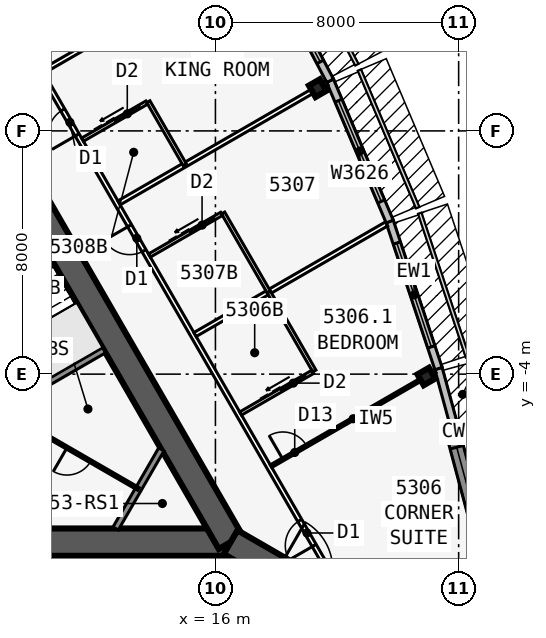
"""IFC4 building model, lengths in metres.
Left out: names, types, materials, properties, quantities, classifications, styles, units other than length and angle.
Written with IfcOpenShell. Run it as: python <this file> out.ifc"""

import sys

from ifc_helpers import new_model, si_unit, direction, frame, frame_2d, origin, origin_2d, place, context, subcontext, project, spatial, polyline, rectangle, i_section, outline, extrude, element, fill, save


model = new_model("IFC4")
c1 = context("Model", 3, precision=1e-05, world=origin(), true_north=direction((0.0, 1.0)))
c2 = subcontext(c1, "Body", "Model", "MODEL_VIEW")
j1 = project(units=[si_unit("LENGTHUNIT", "METRE"), si_unit("PLANEANGLEUNIT", "RADIAN")], contexts=[c1])
p1 = place(None, origin())
s1 = spatial("IfcSite", under=j1, at=p1, CompositionType="ELEMENT")
p2 = place(p1, origin())
s2 = spatial("IfcBuilding", under=s1, at=p2, CompositionType="ELEMENT")
p3 = place(p2, frame((0.0, 0.0, 200.9)))
s3 = spatial("IfcBuildingStorey", under=s2, at=p3, CompositionType="ELEMENT", Elevation=200.9)
p4 = place(p3, frame((-16.5, -9.526, 0.0), z_axis=(0.0, 0.0, 1.0), x_axis=(1.0, 0.0, 0.0)))
e1 = element("IfcWall", 1, at=p4, inside=s3, PredefinedType="SHEAR", context=c2, shape_type="SweptSolid", body=[
    extrude(rectangle(XDim=33.0, YDim=0.9, at=frame_2d((16.5, 0.0))), origin(), (0.0, 0.0, 1.0), 3.6),
])
p5 = place(p4, frame((14.05, 0.0, 0.0)))
e2 = element("IfcOpeningElement", 2, at=p5, cuts=e1, PredefinedType="OPENING", context=c2, shape_type="SweptSolid", body=[
    extrude(rectangle(XDim=1.8, YDim=2.13, at=frame_2d((0.9, 1.065))), frame((0.0, 0.46, 0.0), z_axis=(0.0, -1.0, 0.0), x_axis=(1.0, 0.0, 0.0)), (0.0, 0.0, 1.0), 0.92),
])
p6 = place(p3, frame((16.5, -9.526, 0.0), z_axis=(0.0, 0.0, 1.0), x_axis=(-0.499999749417, 0.866025548458, 0.0)))
e3 = element("IfcWall", 3, at=p6, inside=s3, PredefinedType="SHEAR", context=c2, shape_type="SweptSolid", body=[
    extrude(rectangle(XDim=33.0, YDim=0.9, at=frame_2d((16.5, 0.0))), origin(), (0.0, 0.0, 1.0), 3.6),
])
p7 = place(p6, frame((14.15, 0.0, 0.0)))
e4 = element("IfcOpeningElement", 4, at=p7, cuts=e3, PredefinedType="OPENING", context=c2, shape_type="SweptSolid", body=[
    extrude(rectangle(XDim=1.8, YDim=2.13, at=frame_2d((0.9, 1.065))), frame((0.0, 0.46, 0.0), z_axis=(0.0, -1.0, 0.0), x_axis=(1.0, 0.0, 0.0)), (0.0, 0.0, 1.0), 0.92),
])
p8 = place(p6, frame((12.6, 0.0, 0.0)))
e5 = element("IfcOpeningElement", 5, at=p8, cuts=e3, PredefinedType="OPENING", context=c2, shape_type="SweptSolid", body=[
    extrude(rectangle(XDim=1.0, YDim=2.13, at=frame_2d((0.5, 1.065))), frame((0.0, 0.46, 0.0), z_axis=(0.0, -1.0, 0.0), x_axis=(1.0, 0.0, 0.0)), (0.0, 0.0, 1.0), 0.92),
])
p9 = place(p3, frame((9.629, -4.775, 0.0), z_axis=(0.0, 0.0, 1.0), x_axis=(0.866022959057, 0.500004234368, 0.0)))
e6 = element("IfcWall", 6, at=p9, inside=s3, PredefinedType="SOLIDWALL", context=c2, shape_type="SweptSolid", body=[
    extrude(rectangle(XDim=3.125, YDim=0.2, at=frame_2d((1.562, 0.0))), origin(), (0.0, 0.0, 1.0), 3.435),
])
p10 = place(p3, frame((16.5, -9.526, 0.0), z_axis=(0.0, 0.0, 1.0), x_axis=(0.866031398331, -0.499989616998, 0.0)))
e7 = element("IfcWall", 7, at=p10, inside=s3, PredefinedType="SHEAR", context=c2, shape_type="SweptSolid", body=[
    extrude(rectangle(XDim=4.746, YDim=0.9, at=frame_2d((2.373, 0.0))), origin(), (0.0, 0.0, 1.0), 3.6),
])
p11 = place(p10, frame((1.8, 0.0, 0.0)))
e8 = element("IfcOpeningElement", 8, at=p11, cuts=e7, PredefinedType="OPENING", context=c2, shape_type="SweptSolid", body=[
    extrude(rectangle(XDim=1.8, YDim=2.13, at=frame_2d((0.9, 1.065))), frame((0.0, 0.46, 0.0), z_axis=(0.0, -1.0, 0.0), x_axis=(1.0, 0.0, 0.0)), (0.0, 0.0, 1.0), 0.92),
])
for number, where, z_axis, x_axis in (
    (9, (22.937, -4.078, 0.0), (0.0, 0.0, 1.0), (-0.5, 0.866, 0.0)),
    (10, (19.363, 5.406, 0.0), (0.0, 0.0, 1.0), (0.866, 0.5, 0.0)),
):
    element("IfcColumn", number, at=place(p3, frame(where, z_axis=z_axis, x_axis=x_axis)), inside=s3, PredefinedType="COLUMN", context=c2, shape_type="SweptSolid", body=[
        extrude(i_section(OverallWidth=0.411, OverallDepth=0.434, WebThickness=0.036, FlangeThickness=0.057, at=origin_2d()), origin(), (0.0, 0.0, 1.0), 3.6),
    ])
p12 = place(p3, frame((23.783, -13.798, 0.0), z_axis=(0.0, 0.0, 1.0), x_axis=(0.258799282522, 0.96593112144, 0.0)))
e11 = element("IfcWall", 11, at=p12, inside=s3, PredefinedType="SOLIDWALL", context=c2, shape_type="SweptSolid", body=[
    extrude(outline(polyline([(4.184, 0.225), (0.586, 0.225), (0.551, 0.093), (0.059, 0.225), (0.0, 0.225), (0.0, -0.225), (4.184, -0.225), (4.184, 0.225)])), origin(), (0.0, 0.0, 1.0), 3.435),
])
p13 = place(p12, frame((1.11, 0.0, 0.45)))
e12 = element("IfcOpeningElement", 12, at=p13, cuts=e11, PredefinedType="OPENING", context=c2, shape_type="SweptSolid", body=[
    extrude(rectangle(XDim=2.4, YDim=2.6, at=frame_2d((1.2, 1.3))), frame((0.0, 0.235, 0.0), z_axis=(0.0, -1.0, 0.0), x_axis=(1.0, 0.0, 0.0)), (0.0, 0.0, 1.0), 0.47),
])
p14 = place(p3, frame((24.865, -9.873, 0.0), z_axis=(0.0, 0.0, 1.0), x_axis=(-0.258784695888, 0.965935029479, 0.0)))
e13 = element("IfcWall", 13, at=p14, inside=s3, PredefinedType="SOLIDWALL", context=c2, shape_type="SweptSolid", body=[
    extrude(rectangle(XDim=4.184, YDim=0.45, at=frame_2d((2.092, 0.0))), origin(), (0.0, 0.0, 1.0), 3.435),
])
p15 = place(p14, frame((0.592, 0.0, 0.45)))
e14 = element("IfcOpeningElement", 14, at=p15, cuts=e13, PredefinedType="OPENING", context=c2, shape_type="SweptSolid", body=[
    extrude(rectangle(XDim=3.0, YDim=2.6, at=frame_2d((1.5, 1.3))), frame((0.0, 0.235, 0.0), z_axis=(0.0, -1.0, 0.0), x_axis=(1.0, 0.0, 0.0)), (0.0, 0.0, 1.0), 0.47),
])
p16 = place(p3, frame((23.879, -5.806, 0.0), z_axis=(0.0, 0.0, 1.0), x_axis=(-0.262867703986, 0.964831887015, 0.0)))
e15 = element("IfcWall", 15, at=p16, inside=s3, PredefinedType="STANDARD", context=c2, shape_type="SweptSolid", body=[
    extrude(rectangle(XDim=2.068, YDim=0.25, at=frame_2d((1.034, 0.0))), origin(), (0.0, 0.0, 1.0), 3.435),
])
p17 = place(p3, frame((23.338, -3.817, 0.0), z_axis=(0.0, 0.0, 1.0), x_axis=(-0.315108478109, 0.949055660656, 0.0)))
e16 = element("IfcWall", 16, at=p17, inside=s3, PredefinedType="STANDARD", context=c2, shape_type="SweptSolid", body=[
    extrude(rectangle(XDim=5.105, YDim=0.25, at=frame_2d((2.552, 0.0))), origin(), (0.0, 0.0, 1.0), 3.435),
])
p18 = place(p17, frame((0.752, 0.0, 0.45)))
e17 = element("IfcOpeningElement", 17, at=p18, cuts=e16, PredefinedType="OPENING", context=c2, shape_type="SweptSolid", body=[
    extrude(rectangle(XDim=3.6, YDim=2.6, at=frame_2d((1.8, 1.3))), frame((0.0, 0.135, 0.0), z_axis=(0.0, -1.0, 0.0), x_axis=(1.0, 0.0, 0.0)), (0.0, 0.0, 1.0), 0.27),
])
p19 = place(p3, frame((21.733, 1.018, 0.0), z_axis=(0.0, 0.0, 1.0), x_axis=(-0.390096809471, 0.920773848044, 0.0)))
e18 = element("IfcWall", 18, at=p19, inside=s3, PredefinedType="STANDARD", context=c2, shape_type="SweptSolid", body=[
    extrude(rectangle(XDim=5.038, YDim=0.25, at=frame_2d((2.519, 0.0))), origin(), (0.0, 0.0, 1.0), 3.435),
])
p20 = place(p19, frame((0.719, 0.0, 0.45)))
e19 = element("IfcOpeningElement", 19, at=p20, cuts=e18, PredefinedType="OPENING", context=c2, shape_type="SweptSolid", body=[
    extrude(rectangle(XDim=3.6, YDim=2.6, at=frame_2d((1.8, 1.3))), frame((0.0, 0.135, 0.0), z_axis=(0.0, -1.0, 0.0), x_axis=(1.0, 0.0, 0.0)), (0.0, 0.0, 1.0), 0.27),
])
p21 = place(p3, frame((19.772, 5.648, 0.0), z_axis=(0.0, 0.0, 1.0), x_axis=(-0.463976002579, 0.885847768542, 0.0)))
e20 = element("IfcWall", 20, at=p21, inside=s3, PredefinedType="STANDARD", context=c2, shape_type="SweptSolid", body=[
    extrude(rectangle(XDim=5.004, YDim=0.25, at=frame_2d((2.502, 0.0))), origin(), (0.0, 0.0, 1.0), 3.435),
])
p22 = place(p21, frame((0.702, 0.0, 0.45)))
e21 = element("IfcOpeningElement", 21, at=p22, cuts=e20, PredefinedType="OPENING", context=c2, shape_type="SweptSolid", body=[
    extrude(rectangle(XDim=3.6, YDim=2.6, at=frame_2d((1.8, 1.3))), frame((0.0, 0.135, 0.0), z_axis=(0.0, -1.0, 0.0), x_axis=(1.0, 0.0, 0.0)), (0.0, 0.0, 1.0), 0.27),
])
p23 = place(p3, frame((20.027, -10.985, 0.0), z_axis=(0.0, 0.0, 1.0), x_axis=(-0.500001677587, 0.866024435227, 0.0)))
e22 = element("IfcWall", 22, at=p23, inside=s3, PredefinedType="PARTITIONING", context=c2, shape_type="SweptSolid", body=[
    extrude(rectangle(XDim=39.054, YDim=0.15, at=frame_2d((19.527, 0.0))), origin(), (0.0, 0.0, 1.0), 3.435),
])
p24 = place(p23, frame((1.558, 0.0, 0.0)))
e23 = element("IfcOpeningElement", 23, at=p24, cuts=e22, PredefinedType="OPENING", context=c2, shape_type="SweptSolid", body=[
    extrude(rectangle(XDim=0.95, YDim=2.13, at=frame_2d((0.475, 1.065))), frame((0.0, 0.085, 0.0), z_axis=(0.0, -1.0, 0.0), x_axis=(1.0, 0.0, 0.0)), (0.0, 0.0, 1.0), 0.17),
])
p25 = place(p23, frame((12.752, 0.0, 0.0)))
e24 = element("IfcOpeningElement", 24, at=p25, cuts=e22, PredefinedType="OPENING", context=c2, shape_type="SweptSolid", body=[
    extrude(rectangle(XDim=0.95, YDim=2.13, at=frame_2d((0.475, 1.065))), frame((0.0, 0.085, 0.0), z_axis=(0.0, -1.0, 0.0), x_axis=(1.0, 0.0, 0.0)), (0.0, 0.0, 1.0), 0.17),
])
p26 = place(p23, frame((17.152, 0.0, 0.0)))
e25 = element("IfcOpeningElement", 25, at=p26, cuts=e22, PredefinedType="OPENING", context=c2, shape_type="SweptSolid", body=[
    extrude(rectangle(XDim=0.95, YDim=2.13, at=frame_2d((0.475, 1.065))), frame((0.0, 0.085, 0.0), z_axis=(0.0, -1.0, 0.0), x_axis=(1.0, 0.0, 0.0)), (0.0, 0.0, 1.0), 0.17),
])
p27 = place(p23, frame((22.752, 0.0, 0.0)))
e26 = element("IfcOpeningElement", 26, at=p27, cuts=e22, PredefinedType="OPENING", context=c2, shape_type="SweptSolid", body=[
    extrude(rectangle(XDim=0.95, YDim=2.13, at=frame_2d((0.475, 1.065))), frame((0.0, 0.085, 0.0), z_axis=(0.0, -1.0, 0.0), x_axis=(1.0, 0.0, 0.0)), (0.0, 0.0, 1.0), 0.17),
])
p28 = place(p23, frame((32.152, 0.0, 0.0)))
e27 = element("IfcOpeningElement", 27, at=p28, cuts=e22, PredefinedType="OPENING", context=c2, shape_type="SweptSolid", body=[
    extrude(rectangle(XDim=0.95, YDim=2.13, at=frame_2d((0.475, 1.065))), frame((0.0, 0.085, 0.0), z_axis=(0.0, -1.0, 0.0), x_axis=(1.0, 0.0, 0.0)), (0.0, 0.0, 1.0), 0.17),
])
p29 = place(p23, frame((37.152, 0.0, 0.0)))
e28 = element("IfcOpeningElement", 28, at=p29, cuts=e22, PredefinedType="OPENING", context=c2, shape_type="SweptSolid", body=[
    extrude(rectangle(XDim=0.95, YDim=2.13, at=frame_2d((0.475, 1.065))), frame((0.0, 0.085, 0.0), z_axis=(0.0, -1.0, 0.0), x_axis=(1.0, 0.0, 0.0)), (0.0, 0.0, 1.0), 0.17),
])
p30 = place(p3, frame((17.829, -7.027, 0.0), z_axis=(0.0, 0.0, 1.0), x_axis=(0.866026604282, 0.499997920671, 0.0)))
e29 = element("IfcWall", 29, at=p30, inside=s3, PredefinedType="PARTITIONING", context=c2, shape_type="SweptSolid", body=[
    extrude(rectangle(XDim=6.24, YDim=0.1, at=frame_2d((3.12, 0.0))), origin(), (0.0, 0.0, 1.0), 2.589),
])
p31 = place(p30, frame((0.45, 0.0, 0.0)))
e30 = element("IfcOpeningElement", 30, at=p31, cuts=e29, PredefinedType="OPENING", context=c2, shape_type="SweptSolid", body=[
    extrude(rectangle(XDim=0.9, YDim=2.13, at=frame_2d((0.45, 1.065))), frame((0.0, 0.06, 0.0), z_axis=(0.0, -1.0, 0.0), x_axis=(1.0, 0.0, 0.0)), (0.0, 0.0, 1.0), 0.12),
])
p32 = place(p3, frame((15.329, -2.697, 0.0), z_axis=(0.0, 0.0, 1.0), x_axis=(0.866032413668, 0.499987858329, 0.0)))
e31 = element("IfcWall", 31, at=p32, inside=s3, PredefinedType="PARTITIONING", context=c2, shape_type="SweptSolid", body=[
    extrude(rectangle(XDim=7.273, YDim=0.15, at=frame_2d((3.636, 0.0))), origin(), (0.0, 0.0, 1.0), 2.589),
])
p33 = place(p3, frame((12.829, 1.633, 0.0), z_axis=(0.0, 0.0, 1.0), x_axis=(0.866030558329, 0.49999107196, 0.0)))
e32 = element("IfcWall", 32, at=p33, inside=s3, PredefinedType="PARTITIONING", context=c2, shape_type="SweptSolid", body=[
    extrude(rectangle(XDim=7.894, YDim=0.15, at=frame_2d((3.947, 0.0))), origin(), (0.0, 0.0, 1.0), 2.589),
])
p34 = place(p3, frame((10.329, 5.963, 0.0), z_axis=(0.0, 0.0, 1.0), x_axis=(0.866016460812, 0.500015489362, 0.0)))
e33 = element("IfcWall", 33, at=p34, inside=s3, PredefinedType="PARTITIONING", context=c2, shape_type="SweptSolid", body=[
    extrude(rectangle(XDim=8.101, YDim=0.15, at=frame_2d((4.051, 0.0))), origin(), (0.0, 0.0, 1.0), 2.589),
])
p35 = place(p3, frame((19.253, -3.895, 0.0), z_axis=(0.0, 0.0, 1.0), x_axis=(-0.499990139034, 0.866031096941, 0.0)))
e34 = element("IfcWall", 34, at=p35, inside=s3, PredefinedType="PLUMBINGWALL", context=c2, shape_type="SweptSolid", body=[
    extrude(rectangle(XDim=3.0, YDim=0.12, at=frame_2d((1.5, 0.0))), origin(), (0.0, 0.0, 1.0), 3.435),
])
p36 = place(p3, frame((16.829, -5.295, 0.0), z_axis=(0.0, 0.0, 1.0), x_axis=(0.866035715982, 0.499982138324, 0.0)))
e35 = element("IfcWall", 35, at=p36, inside=s3, PredefinedType="PLUMBINGWALL", context=c2, shape_type="SweptSolid", body=[
    extrude(rectangle(XDim=2.74, YDim=0.12, at=frame_2d((1.37, 0.0))), origin(), (0.0, 0.0, 1.0), 3.435),
])
p37 = place(p36, frame((1.55, 0.0, 0.0)))
e36 = element("IfcOpeningElement", 36, at=p37, cuts=e35, PredefinedType="OPENING", context=c2, shape_type="SweptSolid", body=[
    extrude(rectangle(XDim=0.9, YDim=2.13, at=frame_2d((0.45, 1.065))), frame((0.0, 0.07, 0.0), z_axis=(0.0, -1.0, 0.0), x_axis=(1.0, 0.0, 0.0)), (0.0, 0.0, 1.0), 0.14),
])
p38 = place(p3, frame((17.753, -1.297, 0.0), z_axis=(0.0, 0.0, 1.0), x_axis=(-0.499990139034, 0.866031096941, 0.0)))
e37 = element("IfcWall", 37, at=p38, inside=s3, PredefinedType="PLUMBINGWALL", context=c2, shape_type="SweptSolid", body=[
    extrude(rectangle(XDim=3.0, YDim=0.12, at=frame_2d((1.5, 0.0))), origin(), (0.0, 0.0, 1.0), 3.435),
])
p39 = place(p3, frame((13.829, -0.099, 0.0), z_axis=(0.0, 0.0, 1.0), x_axis=(0.865997131366, 0.500048966069, 0.0)))
e38 = element("IfcWall", 38, at=p39, inside=s3, PredefinedType="PLUMBINGWALL", context=c2, shape_type="SweptSolid", body=[
    extrude(rectangle(XDim=2.74, YDim=0.12, at=frame_2d((1.37, 0.0))), origin(), (0.0, 0.0, 1.0), 3.435),
])
p40 = place(p39, frame((1.55, 0.0, 0.0)))
e39 = element("IfcOpeningElement", 39, at=p40, cuts=e38, PredefinedType="OPENING", context=c2, shape_type="SweptSolid", body=[
    extrude(rectangle(XDim=0.9, YDim=2.13, at=frame_2d((0.45, 1.065))), frame((0.0, 0.07, 0.0), z_axis=(0.0, -1.0, 0.0), x_axis=(1.0, 0.0, 0.0)), (0.0, 0.0, 1.0), 0.14),
])
p41 = place(p3, frame((14.993, 2.883, 0.0), z_axis=(0.0, 0.0, 1.0), x_axis=(-0.500001309137, 0.866024647952, 0.0)))
e40 = element("IfcWall", 40, at=p41, inside=s3, PredefinedType="PLUMBINGWALL", context=c2, shape_type="SweptSolid", body=[
    extrude(rectangle(XDim=2.4, YDim=0.12, at=frame_2d((1.2, 0.0))), origin(), (0.0, 0.0, 1.0), 3.435),
])
p42 = place(p3, frame((11.628, 3.711, 0.0), z_axis=(0.0, 0.0, 1.0), x_axis=(0.866048967903, 0.499959183527, 0.0)))
e41 = element("IfcWall", 41, at=p42, inside=s3, PredefinedType="PLUMBINGWALL", context=c2, shape_type="SweptSolid", body=[
    extrude(rectangle(XDim=2.44, YDim=0.12, at=frame_2d((1.22, 0.0))), origin(), (0.0, 0.0, 1.0), 3.435),
])
p43 = place(p42, frame((1.25, 0.0, 0.0)))
e42 = element("IfcOpeningElement", 42, at=p43, cuts=e41, PredefinedType="OPENING", context=c2, shape_type="SweptSolid", body=[
    extrude(rectangle(XDim=0.9, YDim=2.13, at=frame_2d((0.45, 1.065))), frame((0.0, 0.07, 0.0), z_axis=(0.0, -1.0, 0.0), x_axis=(1.0, 0.0, 0.0)), (0.0, 0.0, 1.0), 0.14),
])
p44 = place(p3, frame((14.219, -6.476, 0.0), z_axis=(0.0, 0.0, 1.0), x_axis=(-0.499952404951, -0.866052881055, 0.0)))
e43 = element("IfcWall", 43, at=p44, inside=s3, PredefinedType="SOLIDWALL", context=c2, shape_type="SweptSolid", body=[
    extrude(rectangle(XDim=3.002, YDim=0.2, at=frame_2d((1.501, 0.0))), origin(), (0.0, 0.0, 1.0), 3.435),
])
p45 = place(p3, frame((13.469, -7.776, 0.0), z_axis=(0.0, 0.0, 1.0), x_axis=(-0.866021898093, 0.500006071987, 0.0)))
e44 = element("IfcWall", 44, at=p45, inside=s3, PredefinedType="PARTITIONING", context=c2, shape_type="SweptSolid", body=[
    extrude(rectangle(XDim=3.775, YDim=0.1, at=frame_2d((1.888, 0.0))), origin(), (0.0, 0.0, 1.0), 3.435),
])
p46 = place(p45, frame((1.815, 0.0, 0.0)))
e45 = element("IfcOpeningElement", 45, at=p46, cuts=e44, PredefinedType="OPENING", context=c2, shape_type="SweptSolid", body=[
    extrude(rectangle(XDim=0.9, YDim=2.13, at=frame_2d((0.45, 1.065))), frame((0.0, 0.06, 0.0), z_axis=(0.0, -1.0, 0.0), x_axis=(1.0, 0.0, 0.0)), (0.0, 0.0, 1.0), 0.12),
])
p47 = place(p15, origin())
e46 = element("IfcWindow", 46, at=p47, inside=s3, PartitioningType="SINGLE_PANEL", PredefinedType="WINDOW", context=c2, shape_type="SweptSolid", body=[
    extrude(rectangle(XDim=3.0, YDim=2.6, at=frame_2d((1.5, 1.3))), frame((0.0, 0.03, 0.0), z_axis=(0.0, -1.0, 0.0), x_axis=(1.0, 0.0, 0.0)), (0.0, 0.0, 1.0), 0.06),
])
fill(e14, e46)
p48 = place(p18, origin())
e47 = element("IfcWindow", 47, at=p48, inside=s3, PartitioningType="SINGLE_PANEL", PredefinedType="WINDOW", context=c2, shape_type="SweptSolid", body=[
    extrude(rectangle(XDim=3.6, YDim=2.6, at=frame_2d((1.8, 1.3))), frame((0.0, 0.03, 0.0), z_axis=(0.0, -1.0, 0.0), x_axis=(1.0, 0.0, 0.0)), (0.0, 0.0, 1.0), 0.06),
])
fill(e17, e47)
p49 = place(p20, origin())
e48 = element("IfcWindow", 48, at=p49, inside=s3, PartitioningType="SINGLE_PANEL", PredefinedType="WINDOW", context=c2, shape_type="SweptSolid", body=[
    extrude(rectangle(XDim=3.6, YDim=2.6, at=frame_2d((1.8, 1.3))), frame((0.0, 0.03, 0.0), z_axis=(0.0, -1.0, 0.0), x_axis=(1.0, 0.0, 0.0)), (0.0, 0.0, 1.0), 0.06),
])
fill(e19, e48)
p50 = place(p22, origin())
e49 = element("IfcWindow", 49, at=p50, inside=s3, PartitioningType="SINGLE_PANEL", PredefinedType="WINDOW", context=c2, shape_type="SweptSolid", body=[
    extrude(rectangle(XDim=3.6, YDim=2.6, at=frame_2d((1.8, 1.3))), frame((0.0, 0.03, 0.0), z_axis=(0.0, -1.0, 0.0), x_axis=(1.0, 0.0, 0.0)), (0.0, 0.0, 1.0), 0.06),
])
fill(e21, e49)
p51 = place(p31, origin())
e50 = element("IfcDoor", 50, at=p51, inside=s3, OperationType="SINGLE_SWING_LEFT", PredefinedType="DOOR", context=c2, shape_type="SweptSolid", body=[
    extrude(rectangle(XDim=0.9, YDim=2.13, at=frame_2d((0.45, 1.065))), frame((0.0, 0.025, 0.0), z_axis=(0.0, -1.0, 0.0), x_axis=(1.0, 0.0, 0.0)), (0.0, 0.0, 1.0), 0.05),
])
fill(e30, e50)
p52 = place(p24, origin())
e51 = element("IfcDoor", 51, at=p52, inside=s3, OperationType="SINGLE_SWING_LEFT", PredefinedType="DOOR", context=c2, shape_type="SweptSolid", body=[
    extrude(rectangle(XDim=0.95, YDim=2.13, at=frame_2d((0.475, 1.065))), frame((0.0, 0.025, 0.0), z_axis=(0.0, -1.0, 0.0), x_axis=(1.0, 0.0, 0.0)), (0.0, 0.0, 1.0), 0.05),
])
fill(e23, e51)
p53 = place(p37, origin())
e52 = element("IfcDoor", 52, at=p53, inside=s3, OperationType="SLIDING_TO_LEFT", PredefinedType="DOOR", context=c2, shape_type="SweptSolid", body=[
    extrude(rectangle(XDim=0.9, YDim=2.13, at=frame_2d((0.45, 1.065))), frame((0.0, 0.025, 0.0), z_axis=(0.0, -1.0, 0.0), x_axis=(1.0, 0.0, 0.0)), (0.0, 0.0, 1.0), 0.05),
])
fill(e36, e52)
p54 = place(p40, origin())
e53 = element("IfcDoor", 53, at=p54, inside=s3, OperationType="SLIDING_TO_LEFT", PredefinedType="DOOR", context=c2, shape_type="SweptSolid", body=[
    extrude(rectangle(XDim=0.9, YDim=2.13, at=frame_2d((0.45, 1.065))), frame((0.0, 0.025, 0.0), z_axis=(0.0, -1.0, 0.0), x_axis=(1.0, 0.0, 0.0)), (0.0, 0.0, 1.0), 0.05),
])
fill(e39, e53)
p55 = place(p25, origin())
e54 = element("IfcDoor", 54, at=p55, inside=s3, OperationType="SINGLE_SWING_RIGHT", PredefinedType="DOOR", context=c2, shape_type="SweptSolid", body=[
    extrude(rectangle(XDim=0.95, YDim=2.13, at=frame_2d((0.475, 1.065))), frame((0.0, 0.025, 0.0), z_axis=(0.0, -1.0, 0.0), x_axis=(1.0, 0.0, 0.0)), (0.0, 0.0, 1.0), 0.05),
])
fill(e24, e54)
p56 = place(p43, origin())
e55 = element("IfcDoor", 55, at=p56, inside=s3, OperationType="SLIDING_TO_LEFT", PredefinedType="DOOR", context=c2, shape_type="SweptSolid", body=[
    extrude(rectangle(XDim=0.9, YDim=2.13, at=frame_2d((0.45, 1.065))), frame((0.0, 0.025, 0.0), z_axis=(0.0, -1.0, 0.0), x_axis=(1.0, 0.0, 0.0)), (0.0, 0.0, 1.0), 0.05),
])
fill(e42, e55)
p57 = place(p26, origin())
e56 = element("IfcDoor", 56, at=p57, inside=s3, OperationType="SINGLE_SWING_LEFT", PredefinedType="DOOR", context=c2, shape_type="SweptSolid", body=[
    extrude(rectangle(XDim=0.95, YDim=2.13, at=frame_2d((0.475, 1.065))), frame((0.0, 0.025, 0.0), z_axis=(0.0, -1.0, 0.0), x_axis=(1.0, 0.0, 0.0)), (0.0, 0.0, 1.0), 0.05),
])
fill(e25, e56)
p58 = place(p46, origin())
e57 = element("IfcDoor", 57, at=p58, inside=s3, OperationType="SINGLE_SWING_RIGHT", PredefinedType="DOOR", context=c2, shape_type="SweptSolid", body=[
    extrude(rectangle(XDim=0.9, YDim=2.13, at=frame_2d((0.45, 1.065))), frame((0.0, 0.025, 0.0), z_axis=(0.0, -1.0, 0.0), x_axis=(1.0, 0.0, 0.0)), (0.0, 0.0, 1.0), 0.05),
])
fill(e45, e57)
save(model, sys.argv[1])
